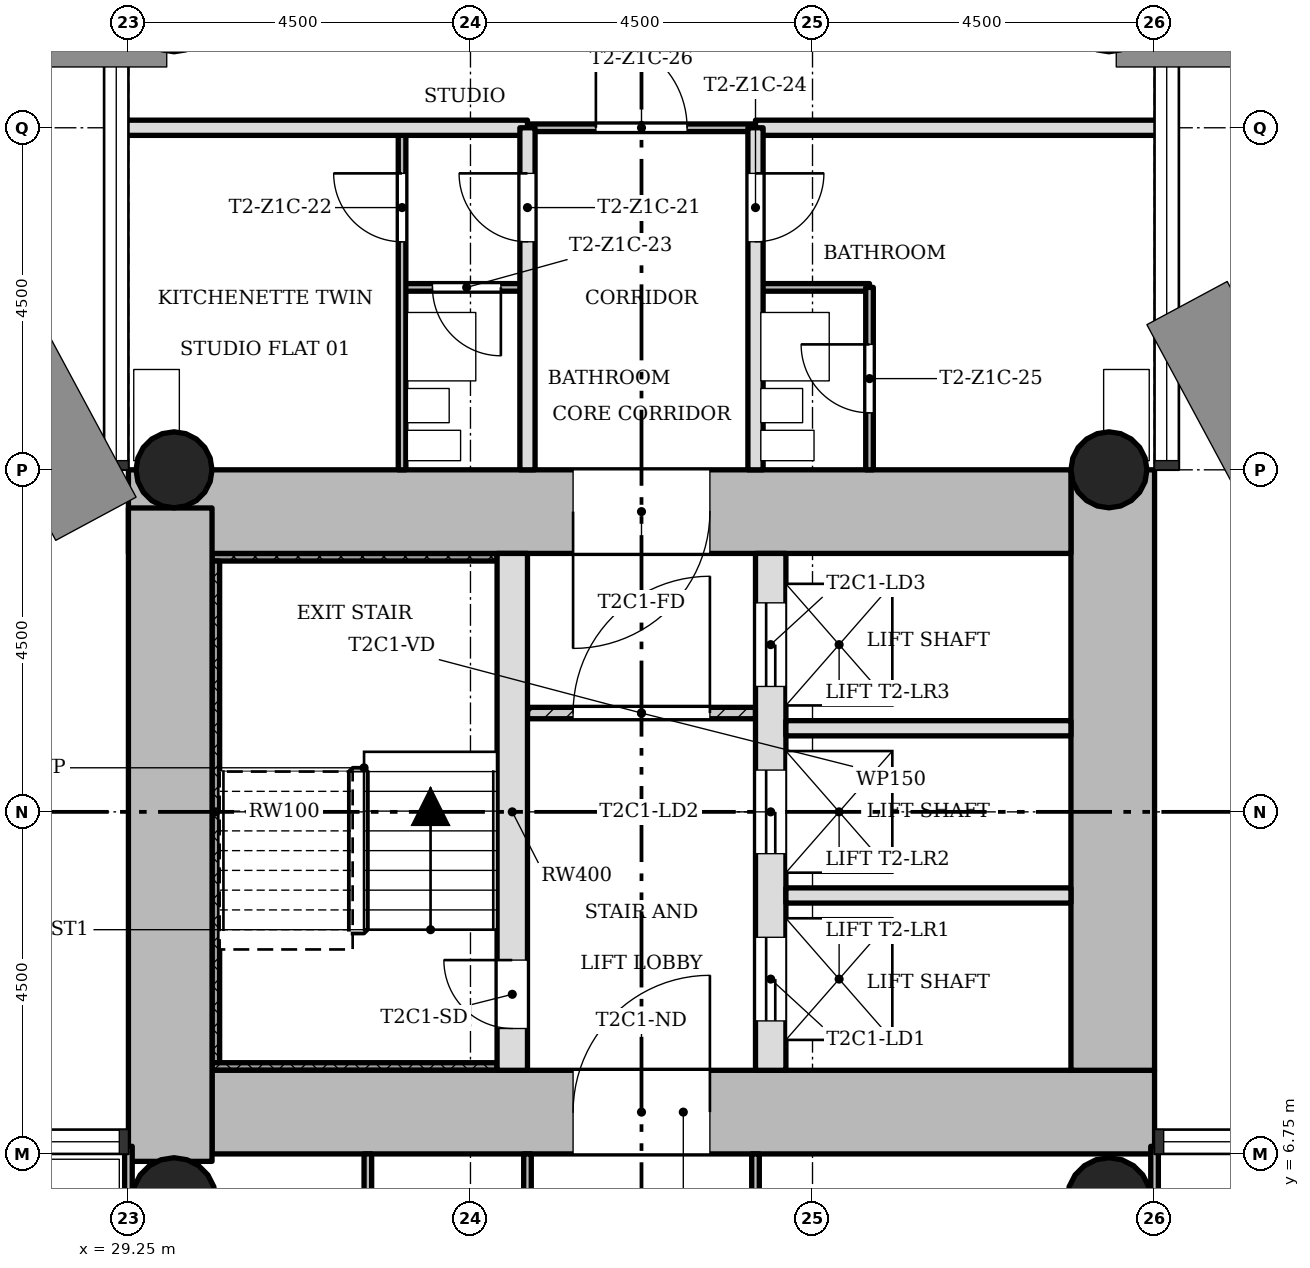
"""IFC4 building model, lengths in metres.
Left out: names, types, materials, properties, quantities, classifications, styles, units other than length and angle.
Written with IfcOpenShell. Run it as: python <this file> out.ifc"""

import sys

from ifc_helpers import new_model, si_unit, direction, frame, frame_2d, origin, origin_2d, place, context, subcontext, project, spatial, rectangle, hollow_circle, extrude, element, fill, save


model = new_model("IFC4")
c1 = context("Model", 3, precision=1e-05, world=origin(), true_north=direction((0.0, 1.0)))
c2 = subcontext(c1, "Body", "Model", "MODEL_VIEW")
j1 = project(units=[si_unit("LENGTHUNIT", "METRE"), si_unit("PLANEANGLEUNIT", "RADIAN")], contexts=[c1])
p1 = place(None, origin())
s1 = spatial("IfcSite", under=j1, at=p1, CompositionType="ELEMENT")
p2 = place(p1, origin())
s2 = spatial("IfcBuilding", under=s1, at=p2, CompositionType="ELEMENT")
p3 = place(p2, frame((0.0, 0.0, 51.7)))
s3 = spatial("IfcBuildingStorey", under=s2, at=p3, CompositionType="ELEMENT", Elevation=51.7)
p4 = place(p3, frame((30.35, 7.3, 0.0), z_axis=(0.0, 0.0, 1.0), x_axis=(1.0, 0.0, 0.0)))
e1 = element("IfcWall", 1, at=p4, inside=s3, PredefinedType="SHEAR", context=c2, shape_type="SweptSolid", body=[
    extrude(rectangle(XDim=12.4, YDim=1.1, at=frame_2d((6.2, 0.0))), origin(), (0.0, 0.0, 1.0), 3.4),
])
p5 = place(p4, frame((4.75, 0.0, 0.0)))
e2 = element("IfcOpeningElement", 2, at=p5, cuts=e1, PredefinedType="OPENING", context=c2, shape_type="SweptSolid", body=[
    extrude(rectangle(XDim=1.8, YDim=2.1, at=frame_2d((0.9, 1.05))), frame((0.0, 0.56, 0.0), z_axis=(0.0, -1.0, 0.0), x_axis=(1.0, 0.0, 0.0)), (0.0, 0.0, 1.0), 1.12),
])
p6 = place(p3, frame((42.2, 7.85, 0.0), z_axis=(0.0, 0.0, 1.0), x_axis=(0.0, 1.0, 0.0)))
e3 = element("IfcWall", 3, at=p6, inside=s3, PredefinedType="SHEAR", context=c2, shape_type="SweptSolid", body=[
    extrude(rectangle(XDim=7.9, YDim=1.1, at=frame_2d((3.95, 0.0))), origin(), (0.0, 0.0, 1.0), 3.4),
])
p7 = place(p3, frame((41.65, 15.2, 0.0), z_axis=(0.0, 0.0, 1.0), x_axis=(-1.0, 0.0, 0.0)))
e4 = element("IfcWall", 4, at=p7, inside=s3, PredefinedType="SHEAR", context=c2, shape_type="SweptSolid", body=[
    extrude(rectangle(XDim=12.4, YDim=1.1, at=frame_2d((6.2, 0.0))), origin(), (0.0, 0.0, 1.0), 3.4),
])
p8 = place(p7, frame((4.75, 0.0, 0.0)))
e5 = element("IfcOpeningElement", 5, at=p8, cuts=e4, PredefinedType="OPENING", context=c2, shape_type="SweptSolid", body=[
    extrude(rectangle(XDim=1.8, YDim=2.1, at=frame_2d((0.9, 1.05))), frame((0.0, 0.56, 0.0), z_axis=(0.0, -1.0, 0.0), x_axis=(1.0, 0.0, 0.0)), (0.0, 0.0, 1.0), 1.12),
])
p9 = place(p3, frame((29.8, 15.248, 0.0), z_axis=(0.0, 0.0, 1.0), x_axis=(0.0, -1.0, 0.0)))
e6 = element("IfcWall", 6, at=p9, inside=s3, PredefinedType="SHEAR", context=c2, shape_type="SweptSolid", body=[
    extrude(rectangle(XDim=8.596, YDim=1.1, at=frame_2d((4.298, 0.0))), origin(), (0.0, 0.0, 1.0), 3.4),
])
p10 = place(p3, frame((34.3, 7.85, 0.0), z_axis=(0.0, 0.0, 1.0), x_axis=(0.0, 1.0, 0.0)))
e7 = element("IfcWall", 7, at=p10, inside=s3, PredefinedType="SHEAR", context=c2, shape_type="SweptSolid", body=[
    extrude(rectangle(XDim=6.8, YDim=0.4, at=frame_2d((3.4, 0.0))), origin(), (0.0, 0.0, 1.0), 3.4),
])
p11 = place(p10, frame((0.55, 0.0, 0.0)))
e8 = element("IfcOpeningElement", 8, at=p11, cuts=e7, PredefinedType="OPENING", context=c2, shape_type="SweptSolid", body=[
    extrude(rectangle(XDim=0.9, YDim=2.1, at=frame_2d((0.45, 1.05))), frame((0.0, 0.21, 0.0), z_axis=(0.0, -1.0, 0.0), x_axis=(1.0, 0.0, 0.0)), (0.0, 0.0, 1.0), 0.42),
])
p12 = place(p3, frame((37.7, 7.85, 0.0), z_axis=(0.0, 0.0, 1.0), x_axis=(0.0, 1.0, 0.0)))
e9 = element("IfcWall", 9, at=p12, inside=s3, PredefinedType="SHEAR", context=c2, shape_type="SweptSolid", body=[
    extrude(rectangle(XDim=6.8, YDim=0.4, at=frame_2d((3.4, 0.0))), origin(), (0.0, 0.0, 1.0), 3.4),
])
p13 = place(p12, frame((0.65, 0.0, 0.0)))
e10 = element("IfcOpeningElement", 10, at=p13, cuts=e9, PredefinedType="OPENING", context=c2, shape_type="SweptSolid", body=[
    extrude(rectangle(XDim=1.1, YDim=2.1, at=frame_2d((0.55, 1.05))), frame((0.0, 0.21, 0.0), z_axis=(0.0, -1.0, 0.0), x_axis=(1.0, 0.0, 0.0)), (0.0, 0.0, 1.0), 0.42),
])
p14 = place(p12, frame((2.85, 0.0, 0.0)))
e11 = element("IfcOpeningElement", 11, at=p14, cuts=e9, PredefinedType="OPENING", context=c2, shape_type="SweptSolid", body=[
    extrude(rectangle(XDim=1.1, YDim=2.1, at=frame_2d((0.55, 1.05))), frame((0.0, 0.21, 0.0), z_axis=(0.0, -1.0, 0.0), x_axis=(1.0, 0.0, 0.0)), (0.0, 0.0, 1.0), 0.42),
])
p15 = place(p12, frame((5.05, 0.0, 0.0)))
e12 = element("IfcOpeningElement", 12, at=p15, cuts=e9, PredefinedType="OPENING", context=c2, shape_type="SweptSolid", body=[
    extrude(rectangle(XDim=1.1, YDim=2.1, at=frame_2d((0.55, 1.05))), frame((0.0, 0.21, 0.0), z_axis=(0.0, -1.0, 0.0), x_axis=(1.0, 0.0, 0.0)), (0.0, 0.0, 1.0), 0.42),
])
for number, where, z_axis, x_axis in (
    (13, (42.15, 15.75, 0.0), (0.0, 0.0, 1.0), (1.0, 0.0, 0.0)),
    (14, (29.85, 15.75, 0.0), (0.0, 0.0, 1.0), (1.0, 0.0, 0.0)),
):
    element("IfcColumn", number, at=place(p3, frame(where, z_axis=z_axis, x_axis=x_axis)), inside=s3, PredefinedType="COLUMN", context=c2, shape_type="SweptSolid", body=[
        extrude(hollow_circle(Radius=0.5, WallThickness=0.036, at=origin_2d()), origin(), (0.0, 0.0, 1.0), 3.4),
    ])
for number, where, z_axis, x_axis in (
    (15, (42.15, 6.15, 0.0), (0.0, 0.0, 1.0), (1.0, 0.0, 0.0)),
    (16, (29.85, 6.15, 0.0), (0.0, 0.0, 1.0), (1.0, 0.0, 0.0)),
):
    element("IfcColumn", number, at=place(p3, frame(where, z_axis=z_axis, x_axis=x_axis)), inside=s3, PredefinedType="COLUMN", context=c2, shape_type="SweptSolid", body=[
        extrude(hollow_circle(Radius=0.55, WallThickness=0.04, at=origin_2d()), origin(), (0.0, 0.0, 1.0), 3.4),
    ])
p16 = place(p3, frame((37.5, 12.55, 0.0), z_axis=(0.0, 0.0, 1.0), x_axis=(-1.0, 0.0, 0.0)))
e17 = element("IfcWall", 17, at=p16, inside=s3, PredefinedType="PARTITIONING", context=c2, shape_type="SweptSolid", body=[
    extrude(rectangle(XDim=3.0, YDim=0.15, at=frame_2d((1.5, 0.0))), origin(), (0.0, 0.0, 1.0), 3.0),
])
p17 = place(p16, frame((0.6, 0.0, 0.0)))
e18 = element("IfcOpeningElement", 18, at=p17, cuts=e17, PredefinedType="OPENING", context=c2, shape_type="SweptSolid", body=[
    extrude(rectangle(XDim=1.8, YDim=2.1, at=frame_2d((0.9, 1.05))), frame((0.0, 0.085, 0.0), z_axis=(0.0, -1.0, 0.0), x_axis=(1.0, 0.0, 0.0)), (0.0, 0.0, 1.0), 0.17),
])
for number, where, z_axis, x_axis in (
    (19, (41.65, 10.15, 0.0), (0.0, 0.0, 1.0), (-1.0, 0.0, 0.0)),
    (20, (41.65, 12.35, 0.0), (0.0, 0.0, 1.0), (-1.0, 0.0, 0.0)),
):
    element("IfcWall", number, at=place(p3, frame(where, z_axis=z_axis, x_axis=x_axis)), inside=s3, PredefinedType="SOLIDWALL", context=c2, shape_type="SweptSolid", body=[
        extrude(rectangle(XDim=3.75, YDim=0.2, at=frame_2d((1.875, 0.0))), origin(), (0.0, 0.0, 1.0), 3.0),
    ])
p18 = place(p3, frame((39.0, 18.15, 0.0), z_axis=(0.0, 0.0, 1.0), x_axis=(-1.0, 0.0, 0.0)))
e21 = element("IfcWall", 21, at=p18, inside=s3, PredefinedType="PARTITIONING", context=c2, shape_type="SweptSolid", body=[
    extrude(rectangle(XDim=1.5, YDim=0.1, at=frame_2d((0.75, 0.0))), origin(), (0.0, 0.0, 1.0), 3.0),
])
p19 = place(p3, frame((34.5, 18.15, 0.0), z_axis=(0.0, 0.0, 1.0), x_axis=(-1.0, 0.0, 0.0)))
e22 = element("IfcWall", 22, at=p19, inside=s3, PredefinedType="PARTITIONING", context=c2, shape_type="SweptSolid", body=[
    extrude(rectangle(XDim=1.65, YDim=0.1, at=frame_2d((0.825, 0.0))), origin(), (0.0, 0.0, 1.0), 3.0),
])
p20 = place(p19, frame((0.35, 0.0, 0.0)))
e23 = element("IfcOpeningElement", 23, at=p20, cuts=e22, PredefinedType="OPENING", context=c2, shape_type="SweptSolid", body=[
    extrude(rectangle(XDim=0.9, YDim=2.1, at=frame_2d((0.45, 1.05))), frame((0.0, 0.06, 0.0), z_axis=(0.0, -1.0, 0.0), x_axis=(1.0, 0.0, 0.0)), (0.0, 0.0, 1.0), 0.12),
])
p21 = place(p3, frame((37.5, 20.25, 0.0), z_axis=(0.0, 0.0, 1.0), x_axis=(-1.0, 0.0, 0.0)))
e24 = element("IfcWall", 24, at=p21, inside=s3, PredefinedType="PARTITIONING", context=c2, shape_type="SweptSolid", body=[
    extrude(rectangle(XDim=3.0, YDim=0.1, at=frame_2d((1.5, 0.0))), origin(), (0.0, 0.0, 1.0), 3.0),
])
p22 = place(p21, frame((0.9, 0.0, 0.0)))
e25 = element("IfcOpeningElement", 25, at=p22, cuts=e24, PredefinedType="OPENING", context=c2, shape_type="SweptSolid", body=[
    extrude(rectangle(XDim=1.2, YDim=2.1, at=frame_2d((0.6, 1.05))), frame((0.0, 0.06, 0.0), z_axis=(0.0, -1.0, 0.0), x_axis=(1.0, 0.0, 0.0)), (0.0, 0.0, 1.0), 0.12),
])
for number, where, z_axis, x_axis in (
    (26, (42.85, 20.25, 0.0), (0.0, 0.0, 1.0), (-1.0, 0.0, 0.0)),
    (27, (34.5, 20.25, 0.0), (0.0, 0.0, 1.0), (-1.0, 0.0, 0.0)),
):
    element("IfcWall", number, at=place(p3, frame(where, z_axis=z_axis, x_axis=x_axis)), inside=s3, PredefinedType="SOLIDWALL", context=c2, shape_type="SweptSolid", body=[
        extrude(rectangle(XDim=5.35, YDim=0.2, at=frame_2d((2.675, 0.0))), origin(), (0.0, 0.0, 1.0), 3.0),
    ])
p23 = place(p3, frame((42.75, 0.9, 0.0), z_axis=(0.0, 0.0, 1.0), x_axis=(0.0, 1.0, 0.0)))
e28 = element("IfcWall", 28, at=p23, inside=s3, PredefinedType="PARTITIONING", context=c2, shape_type="SweptSolid", body=[
    extrude(rectangle(XDim=5.95, YDim=0.1, at=frame_2d((2.975, 0.0))), origin(), (0.0, 0.0, 1.0), 3.0),
])
p24 = place(p3, frame((39.0, 15.75, 0.0), z_axis=(0.0, 0.0, 1.0), x_axis=(0.0, 1.0, 0.0)))
e29 = element("IfcWall", 29, at=p24, inside=s3, PredefinedType="PARTITIONING", context=c2, shape_type="SweptSolid", body=[
    extrude(rectangle(XDim=2.4, YDim=0.1, at=frame_2d((1.2, 0.0))), origin(), (0.0, 0.0, 1.0), 3.0),
])
p25 = place(p24, frame((0.75, 0.0, 0.0)))
e30 = element("IfcOpeningElement", 30, at=p25, cuts=e29, PredefinedType="OPENING", context=c2, shape_type="SweptSolid", body=[
    extrude(rectangle(XDim=0.9, YDim=2.1, at=frame_2d((0.45, 1.05))), frame((0.0, 0.06, 0.0), z_axis=(0.0, -1.0, 0.0), x_axis=(1.0, 0.0, 0.0)), (0.0, 0.0, 1.0), 0.12),
])
p26 = place(p3, frame((37.5, 0.9, 0.0), z_axis=(0.0, 0.0, 1.0), x_axis=(0.0, 1.0, 0.0)))
e31 = element("IfcWall", 31, at=p26, inside=s3, PredefinedType="PARTITIONING", context=c2, shape_type="SweptSolid", body=[
    extrude(rectangle(XDim=5.85, YDim=0.1, at=frame_2d((2.925, 0.0))), origin(), (0.0, 0.0, 1.0), 3.0),
])
p27 = place(p26, frame((2.475, 0.0, 0.0)))
e32 = element("IfcOpeningElement", 32, at=p27, cuts=e31, PredefinedType="OPENING", context=c2, shape_type="SweptSolid", body=[
    extrude(rectangle(XDim=0.9, YDim=2.1, at=frame_2d((0.45, 1.05))), frame((0.0, 0.06, 0.0), z_axis=(0.0, -1.0, 0.0), x_axis=(1.0, 0.0, 0.0)), (0.0, 0.0, 1.0), 0.12),
])
p28 = place(p3, frame((37.5, 15.75, 0.0), z_axis=(0.0, 0.0, 1.0), x_axis=(0.0, 1.0, 0.0)))
e33 = element("IfcWall", 33, at=p28, inside=s3, PredefinedType="SOLIDWALL", context=c2, shape_type="SweptSolid", body=[
    extrude(rectangle(XDim=4.5, YDim=0.2, at=frame_2d((2.25, 0.0))), origin(), (0.0, 0.0, 1.0), 3.0),
])
p29 = place(p28, frame((3.0, 0.0, 0.0)))
e34 = element("IfcOpeningElement", 34, at=p29, cuts=e33, PredefinedType="OPENING", context=c2, shape_type="SweptSolid", body=[
    extrude(rectangle(XDim=0.9, YDim=2.1, at=frame_2d((0.45, 1.05))), frame((0.0, 0.11, 0.0), z_axis=(0.0, -1.0, 0.0), x_axis=(1.0, 0.0, 0.0)), (0.0, 0.0, 1.0), 0.22),
])
p30 = place(p3, frame((34.5, 0.9, 0.0), z_axis=(0.0, 0.0, 1.0), x_axis=(0.0, 1.0, 0.0)))
e35 = element("IfcWall", 35, at=p30, inside=s3, PredefinedType="PARTITIONING", context=c2, shape_type="SweptSolid", body=[
    extrude(rectangle(XDim=5.85, YDim=0.1, at=frame_2d((2.925, 0.0))), origin(), (0.0, 0.0, 1.0), 3.0),
])
p31 = place(p30, frame((2.475, 0.0, 0.0)))
e36 = element("IfcOpeningElement", 36, at=p31, cuts=e35, PredefinedType="OPENING", context=c2, shape_type="SweptSolid", body=[
    extrude(rectangle(XDim=0.9, YDim=2.1, at=frame_2d((0.45, 1.05))), frame((0.0, 0.06, 0.0), z_axis=(0.0, -1.0, 0.0), x_axis=(1.0, 0.0, 0.0)), (0.0, 0.0, 1.0), 0.12),
])
p32 = place(p3, frame((34.5, 15.75, 0.0), z_axis=(0.0, 0.0, 1.0), x_axis=(0.0, 1.0, 0.0)))
e37 = element("IfcWall", 37, at=p32, inside=s3, PredefinedType="SOLIDWALL", context=c2, shape_type="SweptSolid", body=[
    extrude(rectangle(XDim=4.5, YDim=0.2, at=frame_2d((2.25, 0.0))), origin(), (0.0, 0.0, 1.0), 3.0),
])
p33 = place(p32, frame((3.0, 0.0, 0.0)))
e38 = element("IfcOpeningElement", 38, at=p33, cuts=e37, PredefinedType="OPENING", context=c2, shape_type="SweptSolid", body=[
    extrude(rectangle(XDim=0.9, YDim=2.1, at=frame_2d((0.45, 1.05))), frame((0.0, 0.11, 0.0), z_axis=(0.0, -1.0, 0.0), x_axis=(1.0, 0.0, 0.0)), (0.0, 0.0, 1.0), 0.22),
])
p34 = place(p3, frame((32.85, 15.75, 0.0), z_axis=(0.0, 0.0, 1.0), x_axis=(0.0, 1.0, 0.0)))
e39 = element("IfcWall", 39, at=p34, inside=s3, PredefinedType="PARTITIONING", context=c2, shape_type="SweptSolid", body=[
    extrude(rectangle(XDim=4.5, YDim=0.1, at=frame_2d((2.25, 0.0))), origin(), (0.0, 0.0, 1.0), 3.0),
])
p35 = place(p34, frame((3.0, 0.0, 0.0)))
e40 = element("IfcOpeningElement", 40, at=p35, cuts=e39, PredefinedType="OPENING", context=c2, shape_type="SweptSolid", body=[
    extrude(rectangle(XDim=0.9, YDim=2.1, at=frame_2d((0.45, 1.05))), frame((0.0, 0.06, 0.0), z_axis=(0.0, -1.0, 0.0), x_axis=(1.0, 0.0, 0.0)), (0.0, 0.0, 1.0), 0.12),
])
p36 = place(p3, frame((32.4, 0.9, 0.0), z_axis=(0.0, 0.0, 1.0), x_axis=(0.0, 1.0, 0.0)))
e41 = element("IfcWall", 41, at=p36, inside=s3, PredefinedType="PARTITIONING", context=c2, shape_type="SweptSolid", body=[
    extrude(rectangle(XDim=5.85, YDim=0.1, at=frame_2d((2.925, 0.0))), origin(), (0.0, 0.0, 1.0), 3.0),
])
p37 = place(p3, frame((29.25, 0.9, 0.0), z_axis=(0.0, 0.0, 1.0), x_axis=(0.0, 1.0, 0.0)))
e42 = element("IfcWall", 42, at=p37, inside=s3, PredefinedType="PARTITIONING", context=c2, shape_type="SweptSolid", body=[
    extrude(rectangle(XDim=5.95, YDim=0.1, at=frame_2d((2.975, 0.0))), origin(), (0.0, 0.0, 1.0), 3.0),
])
p38 = place(p3, frame((34.1, 14.6, 0.0), z_axis=(0.0, 0.0, 1.0), x_axis=(-1.0, 0.0, 0.0)))
e43 = element("IfcWall", 43, at=p38, inside=s3, PredefinedType="SHEAR", context=c2, shape_type="SweptSolid", body=[
    extrude(rectangle(XDim=3.75, YDim=0.1, at=frame_2d((1.875, 0.0))), origin(), (0.0, 0.0, 1.0), 3.4),
])
p39 = place(p3, frame((30.4, 7.95, 0.0), z_axis=(0.0, 0.0, 1.0), x_axis=(0.0, 1.0, 0.0)))
e44 = element("IfcWall", 44, at=p39, inside=s3, PredefinedType="SHEAR", context=c2, shape_type="SweptSolid", body=[
    extrude(rectangle(XDim=6.6, YDim=0.1, at=frame_2d((3.3, 0.0))), origin(), (0.0, 0.0, 1.0), 3.4),
])
p40 = place(p3, frame((34.1, 7.9, 0.0), z_axis=(0.0, 0.0, 1.0), x_axis=(-1.0, 0.0, 0.0)))
e45 = element("IfcWall", 45, at=p40, inside=s3, PredefinedType="SHEAR", context=c2, shape_type="SweptSolid", body=[
    extrude(rectangle(XDim=3.75, YDim=0.1, at=frame_2d((1.875, 0.0))), origin(), (0.0, 0.0, 1.0), 3.4),
])
p41 = place(p17, origin())
e46 = element("IfcDoor", 46, at=p41, inside=s3, OperationType="SINGLE_SWING_LEFT", PredefinedType="DOOR", context=c2, shape_type="SweptSolid", body=[
    extrude(rectangle(XDim=1.8, YDim=2.1, at=frame_2d((0.9, 1.05))), frame((0.0, 0.025, 0.0), z_axis=(0.0, -1.0, 0.0), x_axis=(1.0, 0.0, 0.0)), (0.0, 0.0, 1.0), 0.05),
])
fill(e18, e46)
p42 = place(p33, origin())
e47 = element("IfcDoor", 47, at=p42, inside=s3, OperationType="SINGLE_SWING_LEFT", PredefinedType="DOOR", context=c2, shape_type="SweptSolid", body=[
    extrude(rectangle(XDim=0.9, YDim=2.1, at=frame_2d((0.45, 1.05))), frame((0.0, 0.025, 0.0), z_axis=(0.0, -1.0, 0.0), x_axis=(1.0, 0.0, 0.0)), (0.0, 0.0, 1.0), 0.05),
])
fill(e38, e47)
p43 = place(p35, origin())
e48 = element("IfcDoor", 48, at=p43, inside=s3, OperationType="SINGLE_SWING_LEFT", PredefinedType="DOOR", context=c2, shape_type="SweptSolid", body=[
    extrude(rectangle(XDim=0.9, YDim=2.1, at=frame_2d((0.45, 1.05))), frame((0.0, 0.025, 0.0), z_axis=(0.0, -1.0, 0.0), x_axis=(1.0, 0.0, 0.0)), (0.0, 0.0, 1.0), 0.05),
])
fill(e40, e48)
p44 = place(p20, origin())
e49 = element("IfcDoor", 49, at=p44, inside=s3, OperationType="SINGLE_SWING_RIGHT", PredefinedType="DOOR", context=c2, shape_type="SweptSolid", body=[
    extrude(rectangle(XDim=0.9, YDim=2.1, at=frame_2d((0.45, 1.05))), frame((0.0, 0.025, 0.0), z_axis=(0.0, -1.0, 0.0), x_axis=(1.0, 0.0, 0.0)), (0.0, 0.0, 1.0), 0.05),
])
fill(e23, e49)
p45 = place(p29, origin())
e50 = element("IfcDoor", 50, at=p45, inside=s3, OperationType="SINGLE_SWING_RIGHT", PredefinedType="DOOR", context=c2, shape_type="SweptSolid", body=[
    extrude(rectangle(XDim=0.9, YDim=2.1, at=frame_2d((0.45, 1.05))), frame((0.0, 0.025, 0.0), z_axis=(0.0, -1.0, 0.0), x_axis=(1.0, 0.0, 0.0)), (0.0, 0.0, 1.0), 0.05),
])
fill(e34, e50)
p46 = place(p25, origin())
e51 = element("IfcDoor", 51, at=p46, inside=s3, OperationType="SINGLE_SWING_LEFT", PredefinedType="DOOR", context=c2, shape_type="SweptSolid", body=[
    extrude(rectangle(XDim=0.9, YDim=2.1, at=frame_2d((0.45, 1.05))), frame((0.0, 0.025, 0.0), z_axis=(0.0, -1.0, 0.0), x_axis=(1.0, 0.0, 0.0)), (0.0, 0.0, 1.0), 0.05),
])
fill(e30, e51)
p47 = place(p22, origin())
e52 = element("IfcDoor", 52, at=p47, inside=s3, OperationType="SINGLE_SWING_RIGHT", PredefinedType="DOOR", context=c2, shape_type="SweptSolid", body=[
    extrude(rectangle(XDim=1.2, YDim=2.1, at=frame_2d((0.6, 1.05))), frame((0.0, 0.025, 0.0), z_axis=(0.0, -1.0, 0.0), x_axis=(1.0, 0.0, 0.0)), (0.0, 0.0, 1.0), 0.05),
])
fill(e25, e52)
p48 = place(p11, origin())
e53 = element("IfcDoor", 53, at=p48, inside=s3, OperationType="SINGLE_SWING_LEFT", PredefinedType="DOOR", context=c2, shape_type="SweptSolid", body=[
    extrude(rectangle(XDim=0.9, YDim=2.1, at=frame_2d((0.45, 1.05))), frame((0.0, 0.025, 0.0), z_axis=(0.0, -1.0, 0.0), x_axis=(1.0, 0.0, 0.0)), (0.0, 0.0, 1.0), 0.05),
])
fill(e8, e53)
p49 = place(p13, origin())
e54 = element("IfcDoor", 54, at=p49, inside=s3, OperationType="SLIDING_TO_LEFT", PredefinedType="DOOR", context=c2, shape_type="SweptSolid", body=[
    extrude(rectangle(XDim=1.1, YDim=2.1, at=frame_2d((0.55, 1.05))), frame((0.0, 0.025, 0.0), z_axis=(0.0, -1.0, 0.0), x_axis=(1.0, 0.0, 0.0)), (0.0, 0.0, 1.0), 0.05),
])
fill(e10, e54)
p50 = place(p14, origin())
e55 = element("IfcDoor", 55, at=p50, inside=s3, OperationType="SLIDING_TO_LEFT", PredefinedType="DOOR", context=c2, shape_type="SweptSolid", body=[
    extrude(rectangle(XDim=1.1, YDim=2.1, at=frame_2d((0.55, 1.05))), frame((0.0, 0.025, 0.0), z_axis=(0.0, -1.0, 0.0), x_axis=(1.0, 0.0, 0.0)), (0.0, 0.0, 1.0), 0.05),
])
fill(e11, e55)
p51 = place(p15, origin())
e56 = element("IfcDoor", 56, at=p51, inside=s3, OperationType="SLIDING_TO_LEFT", PredefinedType="DOOR", context=c2, shape_type="SweptSolid", body=[
    extrude(rectangle(XDim=1.1, YDim=2.1, at=frame_2d((0.55, 1.05))), frame((0.0, 0.025, 0.0), z_axis=(0.0, -1.0, 0.0), x_axis=(1.0, 0.0, 0.0)), (0.0, 0.0, 1.0), 0.05),
])
fill(e12, e56)
p52 = place(p5, origin())
e57 = element("IfcDoor", 57, at=p52, inside=s3, OperationType="SINGLE_SWING_LEFT", PredefinedType="DOOR", context=c2, shape_type="SweptSolid", body=[
    extrude(rectangle(XDim=1.8, YDim=2.1, at=frame_2d((0.9, 1.05))), frame((0.0, 0.025, 0.0), z_axis=(0.0, -1.0, 0.0), x_axis=(1.0, 0.0, 0.0)), (0.0, 0.0, 1.0), 0.05),
])
fill(e2, e57)
p53 = place(p8, origin())
e58 = element("IfcDoor", 58, at=p53, inside=s3, OperationType="SINGLE_SWING_LEFT", PredefinedType="DOOR", context=c2, shape_type="SweptSolid", body=[
    extrude(rectangle(XDim=1.8, YDim=2.1, at=frame_2d((0.9, 1.05))), frame((0.0, 0.025, 0.0), z_axis=(0.0, -1.0, 0.0), x_axis=(1.0, 0.0, 0.0)), (0.0, 0.0, 1.0), 0.05),
])
fill(e5, e58)
save(model, sys.argv[1])
